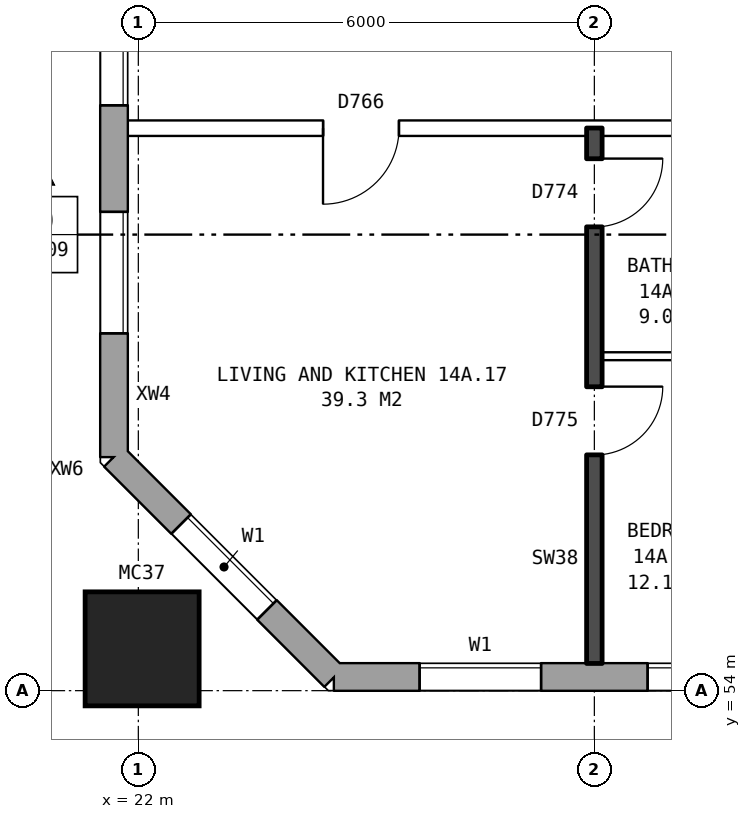
"""IFC4 building model, lengths in metres.
Left out: names, types, materials, properties, quantities, classifications, styles, units other than length and angle.
Written with IfcOpenShell. Run it as: python <this file> out.ifc"""

import sys

from ifc_helpers import new_model, si_unit, direction, frame, frame_2d, origin, origin_2d, place, context, subcontext, project, spatial, rectangle, hollow_rectangle, extrude, element, fill, save


model = new_model("IFC4")
c1 = context("Model", 3, precision=1e-05, world=origin(), true_north=direction((0.0, 1.0)))
c2 = subcontext(c1, "Body", "Model", "MODEL_VIEW")
j1 = project(units=[si_unit("LENGTHUNIT", "METRE"), si_unit("PLANEANGLEUNIT", "RADIAN")], contexts=[c1])
p1 = place(None, origin())
s1 = spatial("IfcSite", under=j1, at=p1, CompositionType="ELEMENT")
p2 = place(p1, origin())
s2 = spatial("IfcBuilding", under=s1, at=p2, CompositionType="ELEMENT")
p3 = place(p2, frame((0.0, 0.0, 53.6)))
s3 = spatial("IfcBuildingStorey", under=s2, at=p3, CompositionType="ELEMENT", Elevation=53.6)
p4 = place(p3, frame((22.05, 54.55, 0.0), z_axis=(0.0, 0.0, 1.0), x_axis=(1.0, 0.0, 0.0)))
e1 = element("IfcColumn", 1, at=p4, inside=s3, PredefinedType="COLUMN", context=c2, shape_type="SweptSolid", body=[
    extrude(hollow_rectangle(XDim=1.5, YDim=1.5, WallThickness=0.08, at=origin_2d()), origin(), (0.0, 0.0, 1.0), 3.1),
])
p5 = place(p3, frame((21.68, 57.075, 0.0), z_axis=(0.0, 0.0, 1.0), x_axis=(0.707106781187, -0.707106781187, 0.0)))
e2 = element("IfcWall", 2, at=p5, inside=s3, PredefinedType="STANDARD", context=c2, shape_type="SweptSolid", body=[
    extrude(rectangle(XDim=4.094, YDim=0.36, at=frame_2d((2.047, 0.0))), origin(), (0.0, 0.0, 1.0), 2.85),
])
p6 = place(p5, frame((1.247, 0.0, 0.8)))
e3 = element("IfcOpeningElement", 3, at=p6, cuts=e2, PredefinedType="OPENING", context=c2, shape_type="SweptSolid", body=[
    extrude(rectangle(XDim=1.6, YDim=1.8, at=frame_2d((0.8, 0.9))), frame((0.0, 0.19, 0.0), z_axis=(0.0, -1.0, 0.0), x_axis=(1.0, 0.0, 0.0)), (0.0, 0.0, 1.0), 0.38),
])
p7 = place(p3, frame((24.575, 54.18, 0.0), z_axis=(0.0, 0.0, 1.0), x_axis=(1.0, 0.0, 0.0)))
e4 = element("IfcWall", 4, at=p7, inside=s3, PredefinedType="STANDARD", context=c2, shape_type="SweptSolid", body=[
    extrude(rectangle(XDim=48.351, YDim=0.36, at=frame_2d((24.175, 0.0))), origin(), (0.0, 0.0, 1.0), 2.85),
])
p8 = place(p7, frame((1.125, 0.0, 0.8)))
e5 = element("IfcOpeningElement", 5, at=p8, cuts=e4, PredefinedType="OPENING", context=c2, shape_type="SweptSolid", body=[
    extrude(rectangle(XDim=1.6, YDim=1.8, at=frame_2d((0.8, 0.9))), frame((0.0, 0.19, 0.0), z_axis=(0.0, -1.0, 0.0), x_axis=(1.0, 0.0, 0.0)), (0.0, 0.0, 1.0), 0.38),
])
p9 = place(p7, frame((4.125, 0.0, 0.8)))
e6 = element("IfcOpeningElement", 6, at=p9, cuts=e4, PredefinedType="OPENING", context=c2, shape_type="SweptSolid", body=[
    extrude(rectangle(XDim=1.6, YDim=1.8, at=frame_2d((0.8, 0.9))), frame((0.0, 0.19, 0.0), z_axis=(0.0, -1.0, 0.0), x_axis=(1.0, 0.0, 0.0)), (0.0, 0.0, 1.0), 0.38),
])
p10 = place(p7, frame((7.125, 0.0, 0.8)))
e7 = element("IfcOpeningElement", 7, at=p10, cuts=e4, PredefinedType="OPENING", context=c2, shape_type="SweptSolid", body=[
    extrude(rectangle(XDim=1.6, YDim=1.8, at=frame_2d((0.8, 0.9))), frame((0.0, 0.19, 0.0), z_axis=(0.0, -1.0, 0.0), x_axis=(1.0, 0.0, 0.0)), (0.0, 0.0, 1.0), 0.38),
])
p11 = place(p7, frame((10.125, 0.0, 0.8)))
e8 = element("IfcOpeningElement", 8, at=p11, cuts=e4, PredefinedType="OPENING", context=c2, shape_type="SweptSolid", body=[
    extrude(rectangle(XDim=1.6, YDim=1.8, at=frame_2d((0.8, 0.9))), frame((0.0, 0.19, 0.0), z_axis=(0.0, -1.0, 0.0), x_axis=(1.0, 0.0, 0.0)), (0.0, 0.0, 1.0), 0.38),
])
p12 = place(p7, frame((12.025, 0.0, 1.7)))
e9 = element("IfcOpeningElement", 9, at=p12, cuts=e4, PredefinedType="OPENING", context=c2, shape_type="SweptSolid", body=[
    extrude(rectangle(XDim=0.8, YDim=0.9, at=frame_2d((0.4, 0.45))), frame((0.0, 0.19, 0.0), z_axis=(0.0, -1.0, 0.0), x_axis=(1.0, 0.0, 0.0)), (0.0, 0.0, 1.0), 0.38),
])
p13 = place(p7, frame((16.125, 0.0, 0.8)))
e10 = element("IfcOpeningElement", 10, at=p13, cuts=e4, PredefinedType="OPENING", context=c2, shape_type="SweptSolid", body=[
    extrude(rectangle(XDim=1.6, YDim=1.8, at=frame_2d((0.8, 0.9))), frame((0.0, 0.19, 0.0), z_axis=(0.0, -1.0, 0.0), x_axis=(1.0, 0.0, 0.0)), (0.0, 0.0, 1.0), 0.38),
])
p14 = place(p7, frame((19.125, 0.0, 0.8)))
e11 = element("IfcOpeningElement", 11, at=p14, cuts=e4, PredefinedType="OPENING", context=c2, shape_type="SweptSolid", body=[
    extrude(rectangle(XDim=1.6, YDim=1.8, at=frame_2d((0.8, 0.9))), frame((0.0, 0.19, 0.0), z_axis=(0.0, -1.0, 0.0), x_axis=(1.0, 0.0, 0.0)), (0.0, 0.0, 1.0), 0.38),
])
p15 = place(p7, frame((22.125, 0.0, 0.8)))
e12 = element("IfcOpeningElement", 12, at=p15, cuts=e4, PredefinedType="OPENING", context=c2, shape_type="SweptSolid", body=[
    extrude(rectangle(XDim=1.6, YDim=1.8, at=frame_2d((0.8, 0.9))), frame((0.0, 0.19, 0.0), z_axis=(0.0, -1.0, 0.0), x_axis=(1.0, 0.0, 0.0)), (0.0, 0.0, 1.0), 0.38),
])
p16 = place(p7, frame((25.125, 0.0, 0.8)))
e13 = element("IfcOpeningElement", 13, at=p16, cuts=e4, PredefinedType="OPENING", context=c2, shape_type="SweptSolid", body=[
    extrude(rectangle(XDim=1.6, YDim=1.8, at=frame_2d((0.8, 0.9))), frame((0.0, 0.19, 0.0), z_axis=(0.0, -1.0, 0.0), x_axis=(1.0, 0.0, 0.0)), (0.0, 0.0, 1.0), 0.38),
])
p17 = place(p7, frame((28.125, 0.0, 0.8)))
e14 = element("IfcOpeningElement", 14, at=p17, cuts=e4, PredefinedType="OPENING", context=c2, shape_type="SweptSolid", body=[
    extrude(rectangle(XDim=1.6, YDim=1.8, at=frame_2d((0.8, 0.9))), frame((0.0, 0.19, 0.0), z_axis=(0.0, -1.0, 0.0), x_axis=(1.0, 0.0, 0.0)), (0.0, 0.0, 1.0), 0.38),
])
p18 = place(p7, frame((31.125, 0.0, 0.8)))
e15 = element("IfcOpeningElement", 15, at=p18, cuts=e4, PredefinedType="OPENING", context=c2, shape_type="SweptSolid", body=[
    extrude(rectangle(XDim=1.6, YDim=1.8, at=frame_2d((0.8, 0.9))), frame((0.0, 0.19, 0.0), z_axis=(0.0, -1.0, 0.0), x_axis=(1.0, 0.0, 0.0)), (0.0, 0.0, 1.0), 0.38),
])
p19 = place(p7, frame((33.625, 0.0, 0.15)))
e16 = element("IfcOpeningElement", 16, at=p19, cuts=e4, PredefinedType="OPENING", context=c2, shape_type="SweptSolid", body=[
    extrude(rectangle(XDim=1.4, YDim=0.9, at=frame_2d((0.7, 0.45))), frame((0.0, 0.19, 0.0), z_axis=(0.0, -1.0, 0.0), x_axis=(1.0, 0.0, 0.0)), (0.0, 0.0, 1.0), 0.38),
])
p20 = place(p7, frame((37.125, 0.0, 0.8)))
e17 = element("IfcOpeningElement", 17, at=p20, cuts=e4, PredefinedType="OPENING", context=c2, shape_type="SweptSolid", body=[
    extrude(rectangle(XDim=1.6, YDim=1.8, at=frame_2d((0.8, 0.9))), frame((0.0, 0.19, 0.0), z_axis=(0.0, -1.0, 0.0), x_axis=(1.0, 0.0, 0.0)), (0.0, 0.0, 1.0), 0.38),
])
p21 = place(p7, frame((40.125, 0.0, 0.8)))
e18 = element("IfcOpeningElement", 18, at=p21, cuts=e4, PredefinedType="OPENING", context=c2, shape_type="SweptSolid", body=[
    extrude(rectangle(XDim=1.6, YDim=1.8, at=frame_2d((0.8, 0.9))), frame((0.0, 0.19, 0.0), z_axis=(0.0, -1.0, 0.0), x_axis=(1.0, 0.0, 0.0)), (0.0, 0.0, 1.0), 0.38),
])
p22 = place(p7, frame((43.125, 0.0, 0.8)))
e19 = element("IfcOpeningElement", 19, at=p22, cuts=e4, PredefinedType="OPENING", context=c2, shape_type="SweptSolid", body=[
    extrude(rectangle(XDim=1.6, YDim=1.8, at=frame_2d((0.8, 0.9))), frame((0.0, 0.19, 0.0), z_axis=(0.0, -1.0, 0.0), x_axis=(1.0, 0.0, 0.0)), (0.0, 0.0, 1.0), 0.38),
])
p23 = place(p7, frame((46.125, 0.0, 0.8)))
e20 = element("IfcOpeningElement", 20, at=p23, cuts=e4, PredefinedType="OPENING", context=c2, shape_type="SweptSolid", body=[
    extrude(rectangle(XDim=1.6, YDim=1.8, at=frame_2d((0.8, 0.9))), frame((0.0, 0.19, 0.0), z_axis=(0.0, -1.0, 0.0), x_axis=(1.0, 0.0, 0.0)), (0.0, 0.0, 1.0), 0.38),
])
p24 = place(p7, frame((14.325, 0.0, 0.8)))
e21 = element("IfcOpeningElement", 21, at=p24, cuts=e4, PredefinedType="OPENING", context=c2, shape_type="SweptSolid", body=[
    extrude(rectangle(XDim=0.8, YDim=0.9, at=frame_2d((0.4, 0.45))), frame((0.0, 0.19, 0.0), z_axis=(0.0, -1.0, 0.0), x_axis=(1.0, 0.0, 0.0)), (0.0, 0.0, 1.0), 0.38),
])
p25 = place(p7, frame((35.525, 0.0, 1.65)))
e22 = element("IfcOpeningElement", 22, at=p25, cuts=e4, PredefinedType="OPENING", context=c2, shape_type="SweptSolid", body=[
    extrude(rectangle(XDim=0.6, YDim=0.9, at=frame_2d((0.3, 0.45))), frame((0.0, 0.19, 0.0), z_axis=(0.0, -1.0, 0.0), x_axis=(1.0, 0.0, 0.0)), (0.0, 0.0, 1.0), 0.38),
])
p26 = place(p3, frame((21.68, 82.925, 0.0), z_axis=(0.0, 0.0, 1.0), x_axis=(0.0, -1.0, 0.0)))
e23 = element("IfcWall", 23, at=p26, inside=s3, PredefinedType="STANDARD", context=c2, shape_type="SweptSolid", body=[
    extrude(rectangle(XDim=25.851, YDim=0.36, at=frame_2d((12.925, 0.0))), origin(), (0.0, 0.0, 1.0), 2.85),
])
p27 = place(p26, frame((1.625, 0.0, 0.8)))
e24 = element("IfcOpeningElement", 24, at=p27, cuts=e23, PredefinedType="OPENING", context=c2, shape_type="SweptSolid", body=[
    extrude(rectangle(XDim=1.6, YDim=1.8, at=frame_2d((0.8, 0.9))), frame((0.0, 0.19, 0.0), z_axis=(0.0, -1.0, 0.0), x_axis=(1.0, 0.0, 0.0)), (0.0, 0.0, 1.0), 0.38),
])
p28 = place(p26, frame((4.625, 0.0, 0.8)))
e25 = element("IfcOpeningElement", 25, at=p28, cuts=e23, PredefinedType="OPENING", context=c2, shape_type="SweptSolid", body=[
    extrude(rectangle(XDim=1.6, YDim=1.8, at=frame_2d((0.8, 0.9))), frame((0.0, 0.19, 0.0), z_axis=(0.0, -1.0, 0.0), x_axis=(1.0, 0.0, 0.0)), (0.0, 0.0, 1.0), 0.38),
])
p29 = place(p26, frame((6.525, 0.0, 0.8)))
e26 = element("IfcOpeningElement", 26, at=p29, cuts=e23, PredefinedType="OPENING", context=c2, shape_type="SweptSolid", body=[
    extrude(rectangle(XDim=1.0, YDim=1.8, at=frame_2d((0.5, 0.9))), frame((0.0, 0.19, 0.0), z_axis=(0.0, -1.0, 0.0), x_axis=(1.0, 0.0, 0.0)), (0.0, 0.0, 1.0), 0.38),
])
p30 = place(p26, frame((7.825, 0.0, 0.8)))
e27 = element("IfcOpeningElement", 27, at=p30, cuts=e23, PredefinedType="OPENING", context=c2, shape_type="SweptSolid", body=[
    extrude(rectangle(XDim=1.2, YDim=0.9, at=frame_2d((0.6, 0.45))), frame((0.0, 0.19, 0.0), z_axis=(0.0, -1.0, 0.0), x_axis=(1.0, 0.0, 0.0)), (0.0, 0.0, 1.0), 0.38),
])
p31 = place(p26, frame((10.275, 0.0, 1.7)))
e28 = element("IfcOpeningElement", 28, at=p31, cuts=e23, PredefinedType="OPENING", context=c2, shape_type="SweptSolid", body=[
    extrude(rectangle(XDim=0.8, YDim=0.9, at=frame_2d((0.4, 0.45))), frame((0.0, 0.19, 0.0), z_axis=(0.0, -1.0, 0.0), x_axis=(1.0, 0.0, 0.0)), (0.0, 0.0, 1.0), 0.38),
])
p32 = place(p26, frame((11.375, 0.0, 1.1)))
e29 = element("IfcOpeningElement", 29, at=p32, cuts=e23, PredefinedType="OPENING", context=c2, shape_type="SweptSolid", body=[
    extrude(rectangle(XDim=0.6, YDim=1.5, at=frame_2d((0.3, 0.75))), frame((0.0, 0.19, 0.0), z_axis=(0.0, -1.0, 0.0), x_axis=(1.0, 0.0, 0.0)), (0.0, 0.0, 1.0), 0.38),
])
p33 = place(p26, frame((19.625, 0.0, 0.8)))
e30 = element("IfcOpeningElement", 30, at=p33, cuts=e23, PredefinedType="OPENING", context=c2, shape_type="SweptSolid", body=[
    extrude(rectangle(XDim=1.6, YDim=1.8, at=frame_2d((0.8, 0.9))), frame((0.0, 0.19, 0.0), z_axis=(0.0, -1.0, 0.0), x_axis=(1.0, 0.0, 0.0)), (0.0, 0.0, 1.0), 0.38),
])
p34 = place(p26, frame((22.625, 0.0, 0.8)))
e31 = element("IfcOpeningElement", 31, at=p34, cuts=e23, PredefinedType="OPENING", context=c2, shape_type="SweptSolid", body=[
    extrude(rectangle(XDim=1.6, YDim=1.8, at=frame_2d((0.8, 0.9))), frame((0.0, 0.19, 0.0), z_axis=(0.0, -1.0, 0.0), x_axis=(1.0, 0.0, 0.0)), (0.0, 0.0, 1.0), 0.38),
])
p35 = place(p26, frame((12.275, 0.0, 0.8)))
e32 = element("IfcOpeningElement", 32, at=p35, cuts=e23, PredefinedType="OPENING", context=c2, shape_type="SweptSolid", body=[
    extrude(rectangle(XDim=1.6, YDim=1.8, at=frame_2d((0.8, 0.9))), frame((0.0, 0.19, 0.0), z_axis=(0.0, -1.0, 0.0), x_axis=(1.0, 0.0, 0.0)), (0.0, 0.0, 1.0), 0.38),
])
p36 = place(p26, frame((14.175, 0.0, 1.7)))
e33 = element("IfcOpeningElement", 33, at=p36, cuts=e23, PredefinedType="OPENING", context=c2, shape_type="SweptSolid", body=[
    extrude(rectangle(XDim=1.4, YDim=0.9, at=frame_2d((0.7, 0.45))), frame((0.0, 0.19, 0.0), z_axis=(0.0, -1.0, 0.0), x_axis=(1.0, 0.0, 0.0)), (0.0, 0.0, 1.0), 0.38),
])
p37 = place(p26, frame((16.725, 0.0, 0.8)))
e34 = element("IfcOpeningElement", 34, at=p37, cuts=e23, PredefinedType="OPENING", context=c2, shape_type="SweptSolid", body=[
    extrude(rectangle(XDim=1.2, YDim=0.9, at=frame_2d((0.6, 0.45))), frame((0.0, 0.19, 0.0), z_axis=(0.0, -1.0, 0.0), x_axis=(1.0, 0.0, 0.0)), (0.0, 0.0, 1.0), 0.38),
])
p38 = place(p26, frame((18.275, 0.0, 0.8)))
e35 = element("IfcOpeningElement", 35, at=p38, cuts=e23, PredefinedType="OPENING", context=c2, shape_type="SweptSolid", body=[
    extrude(rectangle(XDim=1.0, YDim=1.8, at=frame_2d((0.5, 0.9))), frame((0.0, 0.19, 0.0), z_axis=(0.0, -1.0, 0.0), x_axis=(1.0, 0.0, 0.0)), (0.0, 0.0, 1.0), 0.38),
])
p39 = place(p3, frame((28.1, 58.4, 0.0), z_axis=(0.0, 0.0, 1.0), x_axis=(1.0, 0.0, 0.0)))
e36 = element("IfcWall", 36, at=p39, inside=s3, PredefinedType="PARTITIONING", context=c2, shape_type="SweptSolid", body=[
    extrude(rectangle(XDim=2.8, YDim=0.1, at=frame_2d((1.4, 0.0))), origin(), (0.0, 0.0, 1.0), 2.85),
])
p40 = place(p3, frame((21.86, 61.4, 0.0), z_axis=(0.0, 0.0, 1.0), x_axis=(1.0, 0.0, 0.0)))
e37 = element("IfcWall", 37, at=p40, inside=s3, PredefinedType="PARTITIONING", context=c2, shape_type="SweptSolid", body=[
    extrude(rectangle(XDim=24.04, YDim=0.2, at=frame_2d((12.02, 0.0))), origin(), (0.0, 0.0, 1.0), 2.85),
])
p41 = place(p40, frame((19.44, 0.0, 0.0)))
e38 = element("IfcOpeningElement", 38, at=p41, cuts=e37, PredefinedType="OPENING", context=c2, shape_type="SweptSolid", body=[
    extrude(rectangle(XDim=1.0, YDim=2.1, at=frame_2d((0.5, 1.05))), frame((0.0, 0.11, 0.0), z_axis=(0.0, -1.0, 0.0), x_axis=(1.0, 0.0, 0.0)), (0.0, 0.0, 1.0), 0.22),
])
p42 = place(p40, frame((14.64, 0.0, 0.0)))
e39 = element("IfcOpeningElement", 39, at=p42, cuts=e37, PredefinedType="OPENING", context=c2, shape_type="SweptSolid", body=[
    extrude(rectangle(XDim=1.0, YDim=2.1, at=frame_2d((0.5, 1.05))), frame((0.0, 0.11, 0.0), z_axis=(0.0, -1.0, 0.0), x_axis=(1.0, 0.0, 0.0)), (0.0, 0.0, 1.0), 0.22),
])
p43 = place(p40, frame((2.57, 0.0, 0.0)))
e40 = element("IfcOpeningElement", 40, at=p43, cuts=e37, PredefinedType="OPENING", context=c2, shape_type="SweptSolid", body=[
    extrude(rectangle(XDim=1.0, YDim=2.1, at=frame_2d((0.5, 1.05))), frame((0.0, 0.11, 0.0), z_axis=(0.0, -1.0, 0.0), x_axis=(1.0, 0.0, 0.0)), (0.0, 0.0, 1.0), 0.22),
])
p44 = place(p3, frame((28.0, 54.36, 0.0), z_axis=(0.0, 0.0, 1.0), x_axis=(0.0, 1.0, 0.0)))
e41 = element("IfcWall", 41, at=p44, inside=s3, PredefinedType="SOLIDWALL", context=c2, shape_type="SweptSolid", body=[
    extrude(rectangle(XDim=7.04, YDim=0.2, at=frame_2d((3.52, 0.0))), origin(), (0.0, 0.0, 1.0), 2.85),
])
p45 = place(p44, frame((2.74, 0.0, 0.0)))
e42 = element("IfcOpeningElement", 42, at=p45, cuts=e41, PredefinedType="OPENING", context=c2, shape_type="SweptSolid", body=[
    extrude(rectangle(XDim=0.9, YDim=2.1, at=frame_2d((0.45, 1.05))), frame((0.0, 0.11, 0.0), z_axis=(0.0, -1.0, 0.0), x_axis=(1.0, 0.0, 0.0)), (0.0, 0.0, 1.0), 0.22),
])
p46 = place(p44, frame((5.74, 0.0, 0.0)))
e43 = element("IfcOpeningElement", 43, at=p46, cuts=e41, PredefinedType="OPENING", context=c2, shape_type="SweptSolid", body=[
    extrude(rectangle(XDim=0.9, YDim=2.1, at=frame_2d((0.45, 1.05))), frame((0.0, 0.11, 0.0), z_axis=(0.0, -1.0, 0.0), x_axis=(1.0, 0.0, 0.0)), (0.0, 0.0, 1.0), 0.22),
])
p47 = place(p6, origin())
e44 = element("IfcWindow", 44, at=p47, inside=s3, PartitioningType="SINGLE_PANEL", PredefinedType="WINDOW", context=c2, shape_type="SweptSolid", body=[
    extrude(rectangle(XDim=1.6, YDim=1.8, at=frame_2d((0.8, 0.9))), frame((0.0, 0.15, 0.0), z_axis=(0.0, -1.0, 0.0), x_axis=(1.0, 0.0, 0.0)), (0.0, 0.0, 1.0), 0.06),
])
fill(e3, e44)
p48 = place(p8, origin())
e45 = element("IfcWindow", 45, at=p48, inside=s3, PartitioningType="SINGLE_PANEL", PredefinedType="WINDOW", context=c2, shape_type="SweptSolid", body=[
    extrude(rectangle(XDim=1.6, YDim=1.8, at=frame_2d((0.8, 0.9))), frame((0.0, 0.15, 0.0), z_axis=(0.0, -1.0, 0.0), x_axis=(1.0, 0.0, 0.0)), (0.0, 0.0, 1.0), 0.06),
])
fill(e5, e45)
p49 = place(p9, origin())
e46 = element("IfcWindow", 46, at=p49, inside=s3, PartitioningType="SINGLE_PANEL", PredefinedType="WINDOW", context=c2, shape_type="SweptSolid", body=[
    extrude(rectangle(XDim=1.6, YDim=1.8, at=frame_2d((0.8, 0.9))), frame((0.0, 0.15, 0.0), z_axis=(0.0, -1.0, 0.0), x_axis=(1.0, 0.0, 0.0)), (0.0, 0.0, 1.0), 0.06),
])
fill(e6, e46)
p50 = place(p33, origin())
e47 = element("IfcWindow", 47, at=p50, inside=s3, PartitioningType="SINGLE_PANEL", PredefinedType="WINDOW", context=c2, shape_type="SweptSolid", body=[
    extrude(rectangle(XDim=1.6, YDim=1.8, at=frame_2d((0.8, 0.9))), frame((0.0, 0.15, 0.0), z_axis=(0.0, -1.0, 0.0), x_axis=(1.0, 0.0, 0.0)), (0.0, 0.0, 1.0), 0.06),
])
fill(e30, e47)
p51 = place(p34, origin())
e48 = element("IfcWindow", 48, at=p51, inside=s3, PartitioningType="SINGLE_PANEL", PredefinedType="WINDOW", context=c2, shape_type="SweptSolid", body=[
    extrude(rectangle(XDim=1.6, YDim=1.8, at=frame_2d((0.8, 0.9))), frame((0.0, 0.15, 0.0), z_axis=(0.0, -1.0, 0.0), x_axis=(1.0, 0.0, 0.0)), (0.0, 0.0, 1.0), 0.06),
])
fill(e31, e48)
p52 = place(p45, frame((0.9, 0.0, 0.0), z_axis=(0.0, 0.0, 1.0), x_axis=(-1.0, 0.0, 0.0)))
e49 = element("IfcDoor", 49, at=p52, inside=s3, OperationType="SINGLE_SWING_LEFT", PredefinedType="DOOR", context=c2, shape_type="SweptSolid", body=[
    extrude(rectangle(XDim=0.9, YDim=2.1, at=frame_2d((0.45, 1.05))), frame((0.0, 0.025, 0.0), z_axis=(0.0, -1.0, 0.0), x_axis=(1.0, 0.0, 0.0)), (0.0, 0.0, 1.0), 0.05),
])
fill(e42, e49)
p53 = place(p43, frame((1.0, 0.0, 0.0), z_axis=(0.0, 0.0, 1.0), x_axis=(-1.0, 0.0, 0.0)))
e50 = element("IfcDoor", 50, at=p53, inside=s3, OperationType="SINGLE_SWING_RIGHT", PredefinedType="DOOR", context=c2, shape_type="SweptSolid", body=[
    extrude(rectangle(XDim=1.0, YDim=2.1, at=frame_2d((0.5, 1.05))), frame((0.0, 0.025, 0.0), z_axis=(0.0, -1.0, 0.0), x_axis=(1.0, 0.0, 0.0)), (0.0, 0.0, 1.0), 0.05),
])
fill(e40, e50)
p54 = place(p46, frame((0.9, 0.0, 0.0), z_axis=(0.0, 0.0, 1.0), x_axis=(-1.0, 0.0, 0.0)))
e51 = element("IfcDoor", 51, at=p54, inside=s3, OperationType="SINGLE_SWING_LEFT", PredefinedType="DOOR", context=c2, shape_type="SweptSolid", body=[
    extrude(rectangle(XDim=0.9, YDim=2.1, at=frame_2d((0.45, 1.05))), frame((0.0, 0.025, 0.0), z_axis=(0.0, -1.0, 0.0), x_axis=(1.0, 0.0, 0.0)), (0.0, 0.0, 1.0), 0.05),
])
fill(e43, e51)
save(model, sys.argv[1])
